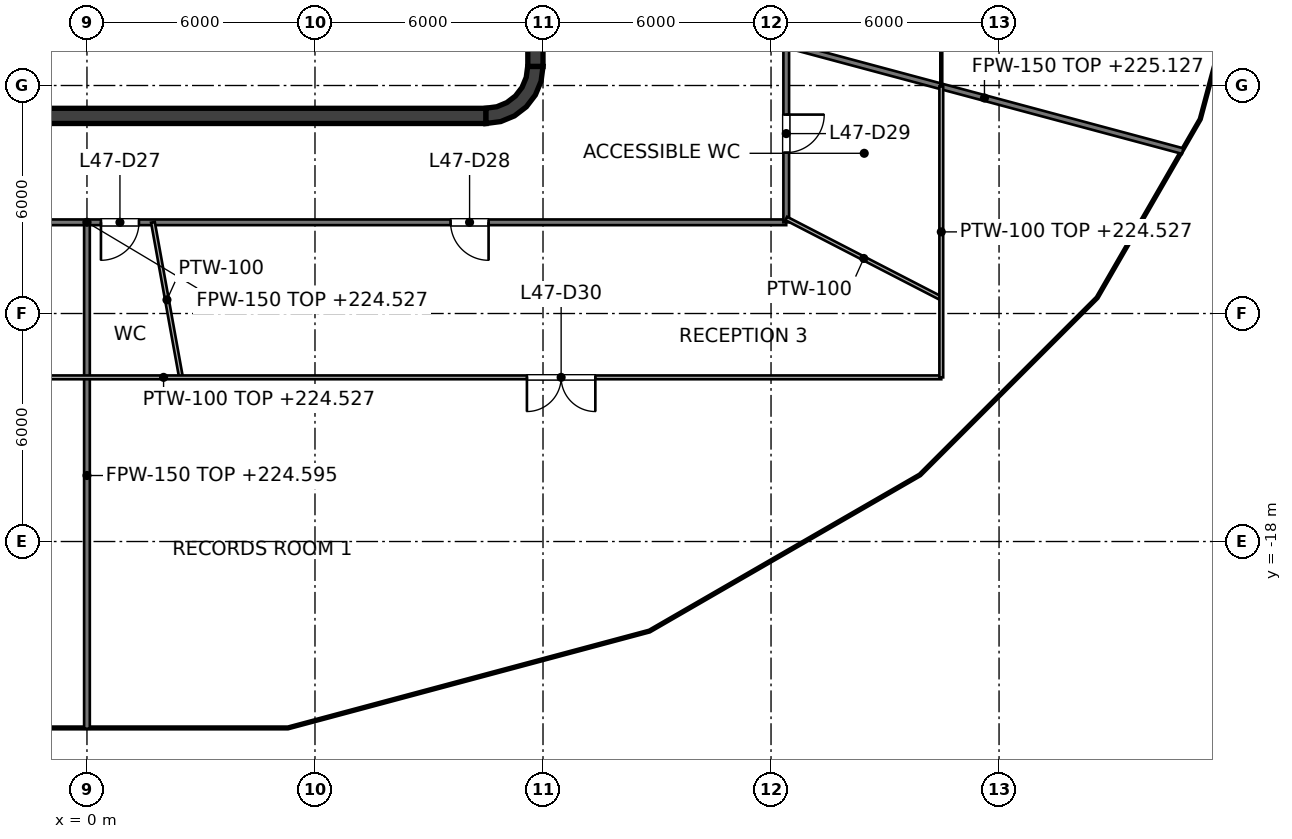
"""IFC4 building model, lengths in metres.
Left out: names, types, materials, properties, quantities, classifications, styles, units other than length and angle.
Written with IfcOpenShell. Run it as: python <this file> out.ifc"""

import sys

from ifc_helpers import new_model, si_unit, direction, frame, frame_2d, origin, place, context, subcontext, project, spatial, polyline, rectangle, outline, extrude, element, fill, save


model = new_model("IFC4")
c1 = context("Model", 3, precision=1e-05, world=origin(), true_north=direction((0.0, 1.0)))
c2 = subcontext(c1, "Body", "Model", "MODEL_VIEW")
j1 = project(units=[si_unit("LENGTHUNIT", "METRE"), si_unit("PLANEANGLEUNIT", "RADIAN")], contexts=[c1])
p1 = place(None, origin())
s1 = spatial("IfcSite", under=j1, at=p1, CompositionType="ELEMENT")
p2 = place(p1, origin())
s2 = spatial("IfcBuilding", under=s1, at=p2, CompositionType="ELEMENT")
p3 = place(p2, frame((0.0, 0.0, 221.6)))
s3 = spatial("IfcBuildingStorey", under=s2, at=p3, CompositionType="ELEMENT", Elevation=221.6)
p4 = place(p3, frame((-10.5, -6.8, 0.0), z_axis=(0.0, 0.0, 1.0), x_axis=(1.0, 0.0, 0.0)))
e1 = element("IfcWall", 1, at=p4, inside=s3, PredefinedType="SHEAR", context=c2, shape_type="SweptSolid", body=[
    extrude(rectangle(XDim=21.0, YDim=0.4, at=frame_2d((10.5, 0.0))), origin(), (0.0, 0.0, 1.0), 4.0),
])
p5 = place(p3, frame((11.8, -5.5, 0.0), z_axis=(0.0, 0.0, 1.0), x_axis=(0.0, 1.0, 0.0)))
e2 = element("IfcWall", 2, at=p5, inside=s3, PredefinedType="SHEAR", context=c2, shape_type="SweptSolid", body=[
    extrude(rectangle(XDim=11.0, YDim=0.4, at=frame_2d((5.5, 0.0))), origin(), (0.0, 0.0, 1.0), 4.0),
])
p6 = place(p5, frame((3.9, 0.0, 0.0)))
e3 = element("IfcOpeningElement", 3, at=p6, cuts=e2, PredefinedType="OPENING", context=c2, shape_type="SweptSolid", body=[
    extrude(rectangle(XDim=1.0, YDim=2.1, at=frame_2d((0.5, 1.05))), frame((0.0, 0.2, 0.0), z_axis=(0.0, -1.0, 0.0), x_axis=(1.0, 0.0, 0.0)), (0.0, 0.0, 1.0), 0.4),
])
p7 = place(p5, frame((6.8, 0.0, 0.0)))
e4 = element("IfcOpeningElement", 4, at=p7, cuts=e2, PredefinedType="OPENING", context=c2, shape_type="SweptSolid", body=[
    extrude(rectangle(XDim=1.0, YDim=2.1, at=frame_2d((0.5, 1.05))), frame((0.0, 0.2, 0.0), z_axis=(0.0, -1.0, 0.0), x_axis=(1.0, 0.0, 0.0)), (0.0, 0.0, 1.0), 0.4),
])
p8 = place(p5, frame((0.9, 0.0, 0.0)))
e5 = element("IfcOpeningElement", 5, at=p8, cuts=e2, PredefinedType="OPENING", context=c2, shape_type="SweptSolid", body=[
    extrude(rectangle(XDim=1.2, YDim=2.1, at=frame_2d((0.6, 1.05))), frame((0.0, 0.2, 0.0), z_axis=(0.0, -1.0, 0.0), x_axis=(1.0, 0.0, 0.0)), (0.0, 0.0, 1.0), 0.4),
])
p9 = place(p5, frame((8.9, 0.0, 0.0)))
e6 = element("IfcOpeningElement", 6, at=p9, cuts=e2, PredefinedType="OPENING", context=c2, shape_type="SweptSolid", body=[
    extrude(rectangle(XDim=1.2, YDim=2.1, at=frame_2d((0.6, 1.05))), frame((0.0, 0.2, 0.0), z_axis=(0.0, -1.0, 0.0), x_axis=(1.0, 0.0, 0.0)), (0.0, 0.0, 1.0), 0.4),
])
p10 = place(p3, origin())
e7 = element("IfcWall", 7, at=p10, inside=s3, PredefinedType="SHEAR", context=c2, shape_type="SweptSolid", body=[
    extrude(outline(polyline([(12.0, -5.5), (11.596, -5.5), (11.559, -5.784), (11.45, -6.048), (11.275, -6.275), (11.048, -6.45), (10.784, -6.559), (10.5, -6.596), (10.5, -7.0), (10.888, -6.949), (11.25, -6.799), (11.561, -6.561), (11.799, -6.25), (11.949, -5.888), (12.0, -5.5)])), origin(), (0.0, 0.0, 1.0), 4.0),
])
p11 = place(p3, frame((0.3, -6.6, 0.0), z_axis=(0.0, 0.0, 1.0), x_axis=(0.0, 1.0, 0.0)))
e8 = element("IfcWall", 8, at=p11, inside=s3, PredefinedType="PARTITIONING", context=c2, shape_type="SweptSolid", body=[
    extrude(rectangle(XDim=2.5, YDim=0.15, at=frame_2d((1.25, 0.0))), origin(), (0.0, 0.0, 1.0), 3.85),
])
p12 = place(p11, frame((0.8, 0.0, 0.0)))
e9 = element("IfcOpeningElement", 9, at=p12, cuts=e8, PredefinedType="OPENING", context=c2, shape_type="SweptSolid", body=[
    extrude(rectangle(XDim=0.9, YDim=2.1, at=frame_2d((0.45, 1.05))), frame((0.0, 0.075, 0.0), z_axis=(0.0, -1.0, 0.0), x_axis=(1.0, 0.0, 0.0)), (0.0, 0.0, 1.0), 0.15),
])
p13 = place(p3, frame((9.0, -6.6, 0.0), z_axis=(0.0, 0.0, 1.0), x_axis=(0.0, 1.0, 0.0)))
e10 = element("IfcWall", 10, at=p13, inside=s3, PredefinedType="SOLIDWALL", context=c2, shape_type="SweptSolid", body=[
    extrude(rectangle(XDim=2.5, YDim=0.25, at=frame_2d((1.25, 0.0))), origin(), (0.0, 0.0, 1.0), 3.85),
])
p14 = place(p13, frame((0.65, 0.0, 0.0)))
e11 = element("IfcOpeningElement", 11, at=p14, cuts=e10, PredefinedType="OPENING", context=c2, shape_type="SweptSolid", body=[
    extrude(rectangle(XDim=1.2, YDim=2.1, at=frame_2d((0.6, 1.05))), frame((0.0, 0.125, 0.0), z_axis=(0.0, -1.0, 0.0), x_axis=(1.0, 0.0, 0.0)), (0.0, 0.0, 1.0), 0.25),
])
p15 = place(p3, frame((3.15, -6.6, 0.0), z_axis=(0.0, 0.0, 1.0), x_axis=(0.0, 1.0, 0.0)))
e12 = element("IfcWall", 12, at=p15, inside=s3, PredefinedType="SOLIDWALL", context=c2, shape_type="SweptSolid", body=[
    extrude(rectangle(XDim=2.5, YDim=0.25, at=frame_2d((1.25, 0.0))), origin(), (0.0, 0.0, 1.0), 3.85),
])
p16 = place(p3, frame((18.4, -4.931, 0.0), z_axis=(0.0, 0.0, 1.0), x_axis=(0.96593412763, -0.25878806209, 0.0)))
e13 = element("IfcWall", 13, at=p16, inside=s3, PredefinedType="PARTITIONING", context=c2, shape_type="SweptSolid", body=[
    extrude(rectangle(XDim=10.8, YDim=0.15, at=frame_2d((5.4, 0.0))), origin(), (0.0, 0.0, 1.0), 3.527),
])
p17 = place(p3, frame((-18.4, -9.6, 0.0), z_axis=(0.0, 0.0, 1.0), x_axis=(1.0, 0.0, 0.0)))
e14 = element("IfcWall", 14, at=p17, inside=s3, PredefinedType="PARTITIONING", context=c2, shape_type="SweptSolid", body=[
    extrude(rectangle(XDim=36.8, YDim=0.15, at=frame_2d((18.4, 0.0))), origin(), (0.0, 0.0, 1.0), 2.927),
])
p18 = place(p17, frame((5.082, 0.0, 0.0)))
e15 = element("IfcOpeningElement", 15, at=p18, cuts=e14, PredefinedType="OPENING", context=c2, shape_type="SweptSolid", body=[
    extrude(rectangle(XDim=1.0, YDim=2.1, at=frame_2d((0.5, 1.05))), frame((0.0, 0.075, 0.0), z_axis=(0.0, -1.0, 0.0), x_axis=(1.0, 0.0, 0.0)), (0.0, 0.0, 1.0), 0.15),
])
p19 = place(p17, frame((11.135, 0.0, 0.0)))
e16 = element("IfcOpeningElement", 16, at=p19, cuts=e14, PredefinedType="OPENING", context=c2, shape_type="SweptSolid", body=[
    extrude(rectangle(XDim=1.0, YDim=2.1, at=frame_2d((0.5, 1.05))), frame((0.0, 0.075, 0.0), z_axis=(0.0, -1.0, 0.0), x_axis=(1.0, 0.0, 0.0)), (0.0, 0.0, 1.0), 0.15),
])
p20 = place(p17, frame((15.588, 0.0, 0.0)))
e17 = element("IfcOpeningElement", 17, at=p20, cuts=e14, PredefinedType="OPENING", context=c2, shape_type="SweptSolid", body=[
    extrude(rectangle(XDim=1.0, YDim=2.1, at=frame_2d((0.5, 1.05))), frame((0.0, 0.075, 0.0), z_axis=(0.0, -1.0, 0.0), x_axis=(1.0, 0.0, 0.0)), (0.0, 0.0, 1.0), 0.15),
])
p21 = place(p17, frame((18.768, 0.0, 0.0)))
e18 = element("IfcOpeningElement", 18, at=p21, cuts=e14, PredefinedType="OPENING", context=c2, shape_type="SweptSolid", body=[
    extrude(rectangle(XDim=1.0, YDim=2.1, at=frame_2d((0.5, 1.05))), frame((0.0, 0.075, 0.0), z_axis=(0.0, -1.0, 0.0), x_axis=(1.0, 0.0, 0.0)), (0.0, 0.0, 1.0), 0.15),
])
p22 = place(p17, frame((27.968, 0.0, 0.0)))
e19 = element("IfcOpeningElement", 19, at=p22, cuts=e14, PredefinedType="OPENING", context=c2, shape_type="SweptSolid", body=[
    extrude(rectangle(XDim=1.0, YDim=2.1, at=frame_2d((0.5, 1.05))), frame((0.0, 0.075, 0.0), z_axis=(0.0, -1.0, 0.0), x_axis=(1.0, 0.0, 0.0)), (0.0, 0.0, 1.0), 0.15),
])
p23 = place(p3, frame((18.4, -9.6, 0.0), z_axis=(0.0, 0.0, 1.0), x_axis=(0.0, 1.0, 0.0)))
e20 = element("IfcWall", 20, at=p23, inside=s3, PredefinedType="PARTITIONING", context=c2, shape_type="SweptSolid", body=[
    extrude(rectangle(XDim=19.2, YDim=0.15, at=frame_2d((9.6, 0.0))), origin(), (0.0, 0.0, 1.0), 2.918),
])
p24 = place(p23, frame((1.834, 0.0, 0.0)))
e21 = element("IfcOpeningElement", 21, at=p24, cuts=e20, PredefinedType="OPENING", context=c2, shape_type="SweptSolid", body=[
    extrude(rectangle(XDim=1.0, YDim=2.1, at=frame_2d((0.5, 1.05))), frame((0.0, 0.075, 0.0), z_axis=(0.0, -1.0, 0.0), x_axis=(1.0, 0.0, 0.0)), (0.0, 0.0, 1.0), 0.15),
])
p25 = place(p23, frame((6.584, 0.0, 0.0)))
e22 = element("IfcOpeningElement", 22, at=p25, cuts=e20, PredefinedType="OPENING", context=c2, shape_type="SweptSolid", body=[
    extrude(rectangle(XDim=1.0, YDim=2.1, at=frame_2d((0.5, 1.05))), frame((0.0, 0.075, 0.0), z_axis=(0.0, -1.0, 0.0), x_axis=(1.0, 0.0, 0.0)), (0.0, 0.0, 1.0), 0.15),
])
p26 = place(p23, frame((11.514, 0.0, 0.0)))
e23 = element("IfcOpeningElement", 23, at=p26, cuts=e20, PredefinedType="OPENING", context=c2, shape_type="SweptSolid", body=[
    extrude(rectangle(XDim=1.0, YDim=2.1, at=frame_2d((0.5, 1.05))), frame((0.0, 0.075, 0.0), z_axis=(0.0, -1.0, 0.0), x_axis=(1.0, 0.0, 0.0)), (0.0, 0.0, 1.0), 0.15),
])
p27 = place(p23, frame((16.365, 0.0, 0.0)))
e24 = element("IfcOpeningElement", 24, at=p27, cuts=e20, PredefinedType="OPENING", context=c2, shape_type="SweptSolid", body=[
    extrude(rectangle(XDim=1.0, YDim=2.1, at=frame_2d((0.5, 1.05))), frame((0.0, 0.075, 0.0), z_axis=(0.0, -1.0, 0.0), x_axis=(1.0, 0.0, 0.0)), (0.0, 0.0, 1.0), 0.15),
])
p28 = place(p3, frame((0.0, -22.926, 0.0), z_axis=(0.0, 0.0, 1.0), x_axis=(0.0, 1.0, 0.0)))
e25 = element("IfcWall", 25, at=p28, inside=s3, PredefinedType="PARTITIONING", context=c2, shape_type="SweptSolid", body=[
    extrude(rectangle(XDim=13.326, YDim=0.15, at=frame_2d((6.663, 0.0))), origin(), (0.0, 0.0, 1.0), 2.995),
])
p29 = place(p3, frame((22.48, -6.024, 0.0), z_axis=(0.0, 0.0, 1.0), x_axis=(0.0, 1.0, 0.0)))
e26 = element("IfcWall", 26, at=p29, inside=s3, PredefinedType="PARTITIONING", context=c2, shape_type="SweptSolid", body=[
    extrude(rectangle(XDim=19.003, YDim=0.05, at=frame_2d((9.501, 0.0))), origin(), (0.0, 0.0, 1.0), 2.918),
])
p30 = place(p29, frame((2.511, 0.0, 0.0)))
e27 = element("IfcOpeningElement", 27, at=p30, cuts=e26, PredefinedType="OPENING", context=c2, shape_type="SweptSolid", body=[
    extrude(rectangle(XDim=1.0, YDim=2.1, at=frame_2d((0.5, 1.05))), frame((0.0, 0.025, 0.0), z_axis=(0.0, -1.0, 0.0), x_axis=(1.0, 0.0, 0.0)), (0.0, 0.0, 1.0), 0.05),
])
p31 = place(p29, frame((8.535, 0.0, 0.0)))
e28 = element("IfcOpeningElement", 28, at=p31, cuts=e26, PredefinedType="OPENING", context=c2, shape_type="SweptSolid", body=[
    extrude(rectangle(XDim=1.0, YDim=2.1, at=frame_2d((0.5, 1.05))), frame((0.0, 0.025, 0.0), z_axis=(0.0, -1.0, 0.0), x_axis=(1.0, 0.0, 0.0)), (0.0, 0.0, 1.0), 0.05),
])
p32 = place(p29, frame((14.974, 0.0, 0.0)))
e29 = element("IfcOpeningElement", 29, at=p32, cuts=e26, PredefinedType="OPENING", context=c2, shape_type="SweptSolid", body=[
    extrude(rectangle(XDim=1.0, YDim=2.1, at=frame_2d((0.5, 1.05))), frame((0.0, 0.025, 0.0), z_axis=(0.0, -1.0, 0.0), x_axis=(1.0, 0.0, 0.0)), (0.0, 0.0, 1.0), 0.05),
])
p33 = place(p3, frame((1.736, -9.6, 0.0), z_axis=(0.0, 0.0, 1.0), x_axis=(0.178009628273, -0.984028745638, 0.0)))
e30 = element("IfcWall", 30, at=p33, inside=s3, PredefinedType="PARTITIONING", context=c2, shape_type="SweptSolid", body=[
    extrude(rectangle(XDim=4.146, YDim=0.1, at=frame_2d((2.073, 0.0))), origin(), (0.0, 0.0, 1.0), 3.85),
])
p34 = place(p3, frame((18.4, -9.498, 0.0), z_axis=(0.0, 0.0, 1.0), x_axis=(0.888610870054, -0.458661881587, 0.0)))
e31 = element("IfcWall", 31, at=p34, inside=s3, PredefinedType="PARTITIONING", context=c2, shape_type="SweptSolid", body=[
    extrude(rectangle(XDim=4.592, YDim=0.1, at=frame_2d((2.296, 0.0))), origin(), (0.0, 0.0, 1.0), 3.85),
])
p35 = place(p3, frame((-18.448, -13.68, 0.0), z_axis=(0.0, 0.0, 1.0), x_axis=(1.0, 0.0, 0.0)))
e32 = element("IfcWall", 32, at=p35, inside=s3, PredefinedType="PARTITIONING", context=c2, shape_type="SweptSolid", body=[
    extrude(rectangle(XDim=40.928, YDim=0.1, at=frame_2d((20.464, 0.0))), origin(), (0.0, 0.0, 1.0), 2.927),
])
p36 = place(p35, frame((14.203, 0.0, 0.0)))
e33 = element("IfcOpeningElement", 33, at=p36, cuts=e32, PredefinedType="OPENING", context=c2, shape_type="SweptSolid", body=[
    extrude(rectangle(XDim=1.8, YDim=2.1, at=frame_2d((0.9, 1.05))), frame((0.0, 0.05, 0.0), z_axis=(0.0, -1.0, 0.0), x_axis=(1.0, 0.0, 0.0)), (0.0, 0.0, 1.0), 0.1),
])
p37 = place(p35, frame((30.025, 0.0, 0.0)))
e34 = element("IfcOpeningElement", 34, at=p37, cuts=e32, PredefinedType="OPENING", context=c2, shape_type="SweptSolid", body=[
    extrude(rectangle(XDim=1.8, YDim=2.1, at=frame_2d((0.9, 1.05))), frame((0.0, 0.05, 0.0), z_axis=(0.0, -1.0, 0.0), x_axis=(1.0, 0.0, 0.0)), (0.0, 0.0, 1.0), 0.1),
])
p38 = place(p3, frame((22.48, -13.68, 0.0), z_axis=(0.0, 0.0, 1.0), x_axis=(0.0, 1.0, 0.0)))
e35 = element("IfcWall", 35, at=p38, inside=s3, PredefinedType="PARTITIONING", context=c2, shape_type="SweptSolid", body=[
    extrude(rectangle(XDim=7.656, YDim=0.1, at=frame_2d((3.828, 0.0))), origin(), (0.0, 0.0, 1.0), 2.927),
])
p39 = place(p14, origin())
e36 = element("IfcDoor", 36, at=p39, inside=s3, OperationType="SINGLE_SWING_LEFT", PredefinedType="DOOR", context=c2, shape_type="SweptSolid", body=[
    extrude(rectangle(XDim=1.2, YDim=2.1, at=frame_2d((0.6, 1.05))), frame((0.0, 0.025, 0.0), z_axis=(0.0, -1.0, 0.0), x_axis=(1.0, 0.0, 0.0)), (0.0, 0.0, 1.0), 0.05),
])
fill(e11, e36)
p40 = place(p12, origin())
e37 = element("IfcDoor", 37, at=p40, inside=s3, OperationType="SINGLE_SWING_RIGHT", PredefinedType="DOOR", context=c2, shape_type="SweptSolid", body=[
    extrude(rectangle(XDim=0.9, YDim=2.1, at=frame_2d((0.45, 1.05))), frame((0.0, 0.025, 0.0), z_axis=(0.0, -1.0, 0.0), x_axis=(1.0, 0.0, 0.0)), (0.0, 0.0, 1.0), 0.05),
])
fill(e9, e37)
p41 = place(p21, origin())
e38 = element("IfcDoor", 38, at=p41, inside=s3, OperationType="SINGLE_SWING_LEFT", PredefinedType="DOOR", context=c2, shape_type="SweptSolid", body=[
    extrude(rectangle(XDim=1.0, YDim=2.1, at=frame_2d((0.5, 1.05))), frame((0.0, 0.025, 0.0), z_axis=(0.0, -1.0, 0.0), x_axis=(1.0, 0.0, 0.0)), (0.0, 0.0, 1.0), 0.05),
])
fill(e18, e38)
p42 = place(p22, origin())
e39 = element("IfcDoor", 39, at=p42, inside=s3, OperationType="SINGLE_SWING_RIGHT", PredefinedType="DOOR", context=c2, shape_type="SweptSolid", body=[
    extrude(rectangle(XDim=1.0, YDim=2.1, at=frame_2d((0.5, 1.05))), frame((0.0, 0.025, 0.0), z_axis=(0.0, -1.0, 0.0), x_axis=(1.0, 0.0, 0.0)), (0.0, 0.0, 1.0), 0.05),
])
fill(e19, e39)
p43 = place(p24, origin())
e40 = element("IfcDoor", 40, at=p43, inside=s3, OperationType="SINGLE_SWING_RIGHT", PredefinedType="DOOR", context=c2, shape_type="SweptSolid", body=[
    extrude(rectangle(XDim=1.0, YDim=2.1, at=frame_2d((0.5, 1.05))), frame((0.0, 0.025, 0.0), z_axis=(0.0, -1.0, 0.0), x_axis=(1.0, 0.0, 0.0)), (0.0, 0.0, 1.0), 0.05),
])
fill(e21, e40)
p44 = place(p37, origin())
e41 = element("IfcDoor", 41, at=p44, inside=s3, OperationType="DOUBLE_DOOR_SINGLE_SWING", PredefinedType="DOOR", context=c2, shape_type="SweptSolid", body=[
    extrude(rectangle(XDim=1.8, YDim=2.1, at=frame_2d((0.9, 1.05))), frame((0.0, 0.025, 0.0), z_axis=(0.0, -1.0, 0.0), x_axis=(1.0, 0.0, 0.0)), (0.0, 0.0, 1.0), 0.05),
])
fill(e34, e41)
save(model, sys.argv[1])
